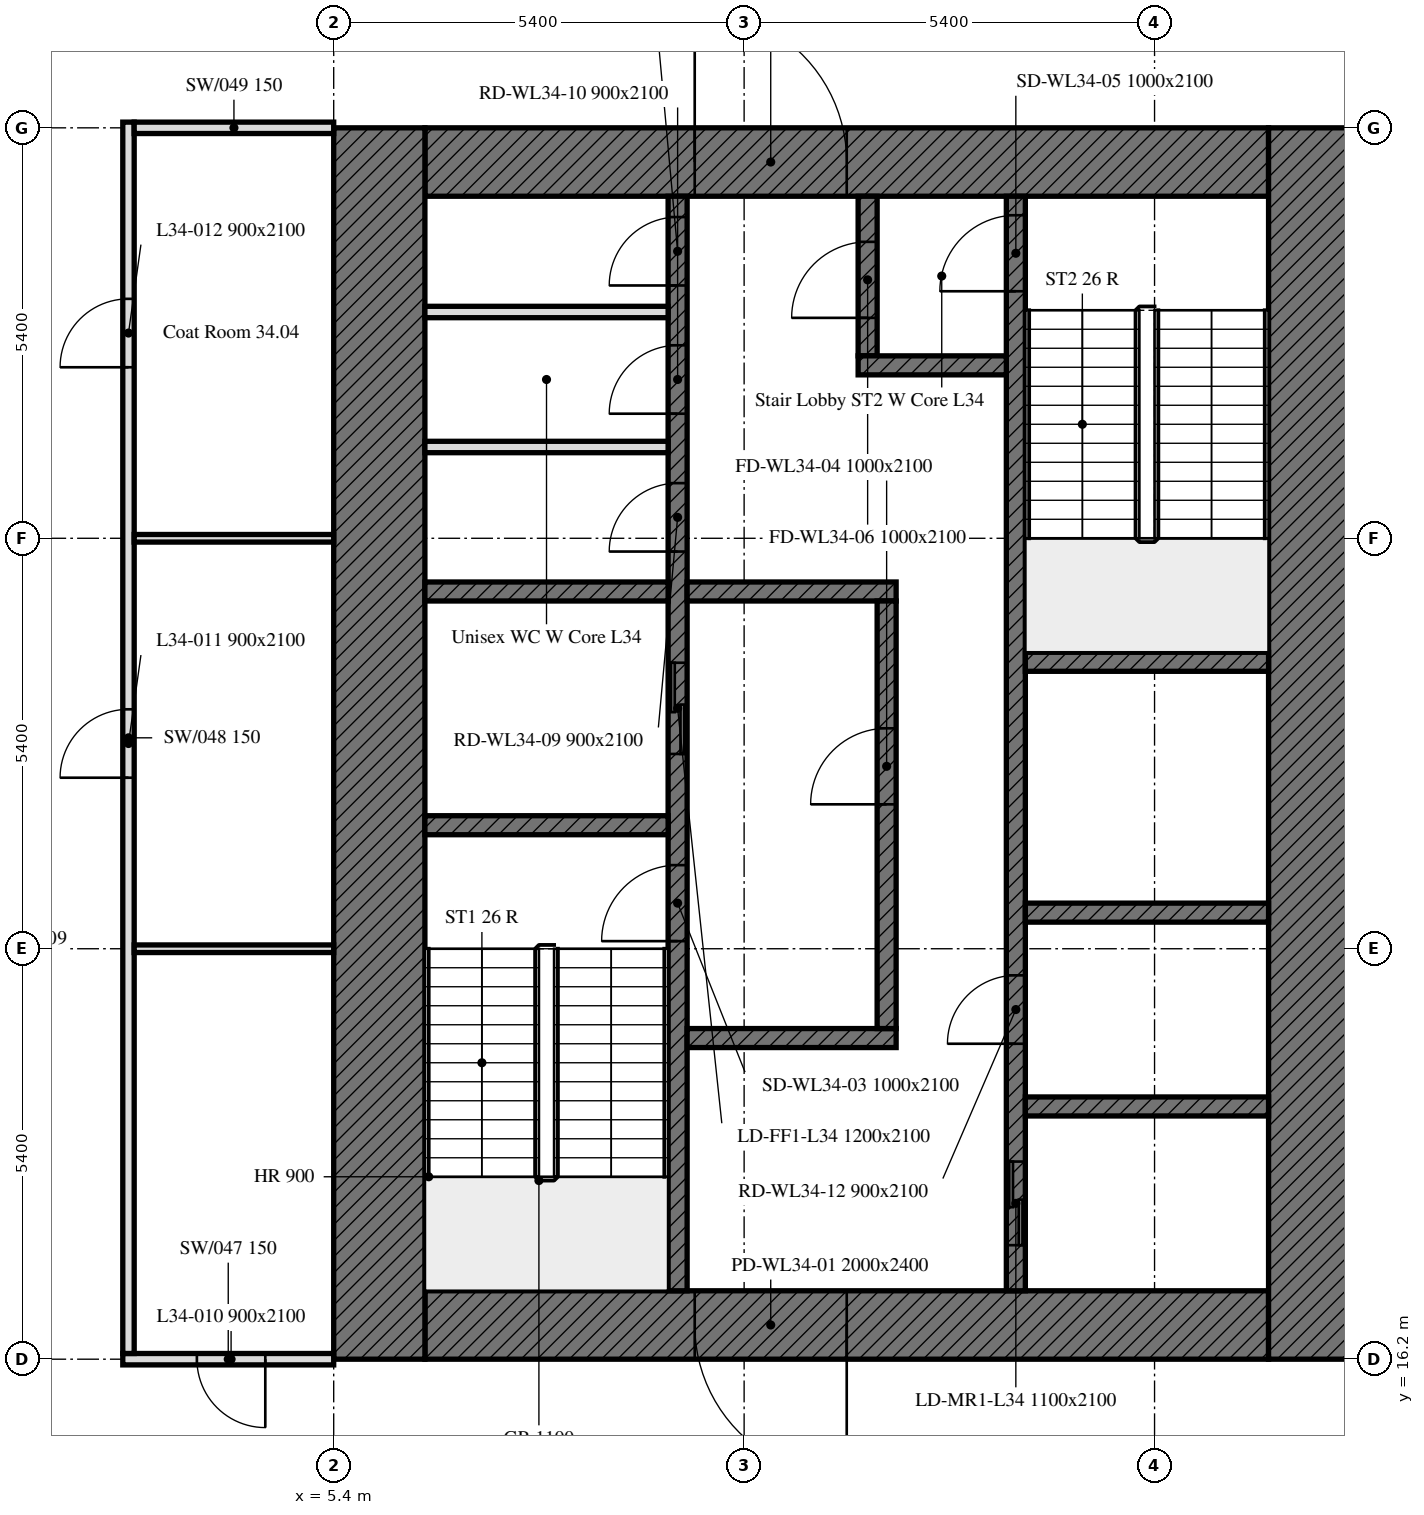
"""IFC4 building model, lengths in metres.
Left out: names, types, materials, properties, quantities, classifications, styles, units other than length and angle.
Written with IfcOpenShell. Run it as: python <this file> out.ifc"""

import sys

from ifc_helpers import new_model, si_unit, direction, frame, frame_2d, origin, place, context, subcontext, project, spatial, rectangle, extrude, element, fill, save


model = new_model("IFC4")
c1 = context("Model", 3, precision=1e-05, world=origin(), true_north=direction((0.0, 1.0)))
c2 = subcontext(c1, "Body", "Model", "MODEL_VIEW")
j1 = project(units=[si_unit("LENGTHUNIT", "METRE"), si_unit("PLANEANGLEUNIT", "RADIAN")], contexts=[c1])
p1 = place(None, origin())
s1 = spatial("IfcSite", under=j1, at=p1, CompositionType="ELEMENT")
p2 = place(p1, origin())
s2 = spatial("IfcBuilding", under=s1, at=p2, CompositionType="ELEMENT")
p3 = place(p2, frame((0.0, 0.0, 148.0)))
s3 = spatial("IfcBuildingStorey", under=s2, at=p3, CompositionType="ELEMENT", Elevation=148.0)
p4 = place(p3, frame((17.7, 16.65, 0.0), z_axis=(0.0, 0.0, 1.0), x_axis=(-1.0, 0.0, 0.0)))
e1 = element("IfcWall", 1, at=p4, inside=s3, PredefinedType="SOLIDWALL", context=c2, shape_type="SweptSolid", body=[
    extrude(rectangle(XDim=11.1, YDim=0.9, at=frame_2d((5.55, 0.0))), origin(), (0.0, 0.0, 1.0), 4.5),
])
p5 = place(p4, frame((5.55, 0.0, 0.0)))
e2 = element("IfcOpeningElement", 2, at=p5, cuts=e1, PredefinedType="OPENING", context=c2, shape_type="SweptSolid", body=[
    extrude(rectangle(XDim=2.0, YDim=2.4, at=frame_2d((1.0, 1.2))), frame((0.0, 0.45, 0.0), z_axis=(0.0, -1.0, 0.0), x_axis=(1.0, 0.0, 0.0)), (0.0, 0.0, 1.0), 0.9),
])
p6 = place(p3, frame((6.6, 31.95, 0.0), z_axis=(0.0, 0.0, 1.0), x_axis=(1.0, 0.0, 0.0)))
e3 = element("IfcWall", 3, at=p6, inside=s3, PredefinedType="SOLIDWALL", context=c2, shape_type="SweptSolid", body=[
    extrude(rectangle(XDim=11.1, YDim=0.9, at=frame_2d((5.55, 0.0))), origin(), (0.0, 0.0, 1.0), 4.5),
])
p7 = place(p6, frame((3.55, 0.0, 0.0)))
e4 = element("IfcOpeningElement", 4, at=p7, cuts=e3, PredefinedType="OPENING", context=c2, shape_type="SweptSolid", body=[
    extrude(rectangle(XDim=2.0, YDim=2.4, at=frame_2d((1.0, 1.2))), frame((0.0, 0.45, 0.0), z_axis=(0.0, -1.0, 0.0), x_axis=(1.0, 0.0, 0.0)), (0.0, 0.0, 1.0), 0.9),
])
for number, where, z_axis, x_axis in (
    (5, (6.0, 16.2, 0.0), (0.0, 0.0, 1.0), (0.0, 1.0, 0.0)),
    (6, (18.3, 32.4, 0.0), (0.0, 0.0, 1.0), (0.0, -1.0, 0.0)),
):
    element("IfcWall", number, at=place(p3, frame(where, z_axis=z_axis, x_axis=x_axis)), inside=s3, PredefinedType="SOLIDWALL", context=c2, shape_type="SweptSolid", body=[
        extrude(rectangle(XDim=16.2, YDim=1.2, at=frame_2d((8.1, 0.0))), origin(), (0.0, 0.0, 1.0), 4.5),
    ])
p8 = place(p3, frame((9.925, 17.1, 0.0), z_axis=(0.0, 0.0, 1.0), x_axis=(0.0, 1.0, 0.0)))
e7 = element("IfcWall", 7, at=p8, inside=s3, PredefinedType="SOLIDWALL", context=c2, shape_type="SweptSolid", body=[
    extrude(rectangle(XDim=14.4, YDim=0.25, at=frame_2d((7.2, 0.0))), origin(), (0.0, 0.0, 1.0), 4.5),
])
p9 = place(p8, frame((4.6, 0.0, 0.0)))
e8 = element("IfcOpeningElement", 8, at=p9, cuts=e7, PredefinedType="OPENING", context=c2, shape_type="SweptSolid", body=[
    extrude(rectangle(XDim=1.0, YDim=2.1, at=frame_2d((0.5, 1.05))), frame((0.0, 0.125, 0.0), z_axis=(0.0, -1.0, 0.0), x_axis=(1.0, 0.0, 0.0)), (0.0, 0.0, 1.0), 0.25),
])
p10 = place(p8, frame((7.062, 0.0, 0.0)))
e9 = element("IfcOpeningElement", 9, at=p10, cuts=e7, PredefinedType="OPENING", context=c2, shape_type="SweptSolid", body=[
    extrude(rectangle(XDim=1.2, YDim=2.1, at=frame_2d((0.6, 1.05))), frame((0.0, 0.125, 0.0), z_axis=(0.0, -1.0, 0.0), x_axis=(1.0, 0.0, 0.0)), (0.0, 0.0, 1.0), 0.25),
])
p11 = place(p8, frame((9.726, 0.0, 0.0)))
e10 = element("IfcOpeningElement", 10, at=p11, cuts=e7, PredefinedType="OPENING", context=c2, shape_type="SweptSolid", body=[
    extrude(rectangle(XDim=0.9, YDim=2.1, at=frame_2d((0.45, 1.05))), frame((0.0, 0.125, 0.0), z_axis=(0.0, -1.0, 0.0), x_axis=(1.0, 0.0, 0.0)), (0.0, 0.0, 1.0), 0.25),
])
p12 = place(p8, frame((11.539, 0.0, 0.0)))
e11 = element("IfcOpeningElement", 11, at=p12, cuts=e7, PredefinedType="OPENING", context=c2, shape_type="SweptSolid", body=[
    extrude(rectangle(XDim=0.9, YDim=2.1, at=frame_2d((0.45, 1.05))), frame((0.0, 0.125, 0.0), z_axis=(0.0, -1.0, 0.0), x_axis=(1.0, 0.0, 0.0)), (0.0, 0.0, 1.0), 0.25),
])
p13 = place(p8, frame((13.226, 0.0, 0.0)))
e12 = element("IfcOpeningElement", 12, at=p13, cuts=e7, PredefinedType="OPENING", context=c2, shape_type="SweptSolid", body=[
    extrude(rectangle(XDim=0.9, YDim=2.1, at=frame_2d((0.45, 1.05))), frame((0.0, 0.125, 0.0), z_axis=(0.0, -1.0, 0.0), x_axis=(1.0, 0.0, 0.0)), (0.0, 0.0, 1.0), 0.25),
])
p14 = place(p3, frame((14.375, 17.1, 0.0), z_axis=(0.0, 0.0, 1.0), x_axis=(0.0, 1.0, 0.0)))
e13 = element("IfcWall", 13, at=p14, inside=s3, PredefinedType="SOLIDWALL", context=c2, shape_type="SweptSolid", body=[
    extrude(rectangle(XDim=14.4, YDim=0.25, at=frame_2d((7.2, 0.0))), origin(), (0.0, 0.0, 1.0), 4.5),
])
p15 = place(p14, frame((13.15, 0.0, 0.0)))
e14 = element("IfcOpeningElement", 14, at=p15, cuts=e13, PredefinedType="OPENING", context=c2, shape_type="SweptSolid", body=[
    extrude(rectangle(XDim=1.0, YDim=2.1, at=frame_2d((0.5, 1.05))), frame((0.0, 0.125, 0.0), z_axis=(0.0, -1.0, 0.0), x_axis=(1.0, 0.0, 0.0)), (0.0, 0.0, 1.0), 0.25),
])
p16 = place(p14, frame((0.6, 0.0, 0.0)))
e15 = element("IfcOpeningElement", 15, at=p16, cuts=e13, PredefinedType="OPENING", context=c2, shape_type="SweptSolid", body=[
    extrude(rectangle(XDim=1.1, YDim=2.1, at=frame_2d((0.55, 1.05))), frame((0.0, 0.125, 0.0), z_axis=(0.0, -1.0, 0.0), x_axis=(1.0, 0.0, 0.0)), (0.0, 0.0, 1.0), 0.25),
])
p17 = place(p14, frame((3.25, 0.0, 0.0)))
e16 = element("IfcOpeningElement", 16, at=p17, cuts=e13, PredefinedType="OPENING", context=c2, shape_type="SweptSolid", body=[
    extrude(rectangle(XDim=0.9, YDim=2.1, at=frame_2d((0.45, 1.05))), frame((0.0, 0.125, 0.0), z_axis=(0.0, -1.0, 0.0), x_axis=(1.0, 0.0, 0.0)), (0.0, 0.0, 1.0), 0.25),
])
for number, where, z_axis, x_axis in (
    (17, (6.6, 23.225, 0.0), (0.0, 0.0, 1.0), (1.0, 0.0, 0.0)),
    (18, (14.5, 25.375, 0.0), (0.0, 0.0, 1.0), (1.0, 0.0, 0.0)),
    (19, (14.5, 22.075, 0.0), (0.0, 0.0, 1.0), (1.0, 0.0, 0.0)),
    (20, (6.6, 26.3, 0.0), (0.0, 0.0, 1.0), (1.0, 0.0, 0.0)),
):
    element("IfcWall", number, at=place(p3, frame(where, z_axis=z_axis, x_axis=x_axis)), inside=s3, PredefinedType="SOLIDWALL", context=c2, shape_type="SweptSolid", body=[
        extrude(rectangle(XDim=3.2, YDim=0.25, at=frame_2d((1.6, 0.0))), origin(), (0.0, 0.0, 1.0), 4.5),
    ])
for number, where, z_axis, x_axis in (
    (21, (10.05, 26.3, 0.0), (0.0, 0.0, 1.0), (1.0, 0.0, 0.0)),
    (22, (10.05, 20.425, 0.0), (0.0, 0.0, 1.0), (1.0, 0.0, 0.0)),
):
    element("IfcWall", number, at=place(p3, frame(where, z_axis=z_axis, x_axis=x_axis)), inside=s3, PredefinedType="SOLIDWALL", context=c2, shape_type="SweptSolid", body=[
        extrude(rectangle(XDim=2.75, YDim=0.25, at=frame_2d((1.375, 0.0))), origin(), (0.0, 0.0, 1.0), 4.5),
    ])
p18 = place(p3, frame((12.425, 29.4, 0.0), z_axis=(0.0, 0.0, 1.0), x_axis=(0.0, 1.0, 0.0)))
e23 = element("IfcWall", 23, at=p18, inside=s3, PredefinedType="SOLIDWALL", context=c2, shape_type="SweptSolid", body=[
    extrude(rectangle(XDim=2.1, YDim=0.25, at=frame_2d((1.05, 0.0))), origin(), (0.0, 0.0, 1.0), 4.5),
])
p19 = place(p18, frame((0.5, 0.0, 0.0)))
e24 = element("IfcOpeningElement", 24, at=p19, cuts=e23, PredefinedType="OPENING", context=c2, shape_type="SweptSolid", body=[
    extrude(rectangle(XDim=1.0, YDim=2.1, at=frame_2d((0.5, 1.05))), frame((0.0, 0.125, 0.0), z_axis=(0.0, -1.0, 0.0), x_axis=(1.0, 0.0, 0.0)), (0.0, 0.0, 1.0), 0.25),
])
p20 = place(p3, frame((12.3, 29.275, 0.0), z_axis=(0.0, 0.0, 1.0), x_axis=(1.0, 0.0, 0.0)))
e25 = element("IfcWall", 25, at=p20, inside=s3, PredefinedType="SOLIDWALL", context=c2, shape_type="SweptSolid", body=[
    extrude(rectangle(XDim=1.95, YDim=0.25, at=frame_2d((0.975, 0.0))), origin(), (0.0, 0.0, 1.0), 4.5),
])
p21 = place(p3, frame((12.675, 20.55, 0.0), z_axis=(0.0, 0.0, 1.0), x_axis=(0.0, 1.0, 0.0)))
e26 = element("IfcWall", 26, at=p21, inside=s3, PredefinedType="SOLIDWALL", context=c2, shape_type="SweptSolid", body=[
    extrude(rectangle(XDim=5.625, YDim=0.25, at=frame_2d((2.812, 0.0))), origin(), (0.0, 0.0, 1.0), 4.5),
])
p22 = place(p21, frame((2.95, 0.0, 0.0)))
e27 = element("IfcOpeningElement", 27, at=p22, cuts=e26, PredefinedType="OPENING", context=c2, shape_type="SweptSolid", body=[
    extrude(rectangle(XDim=1.0, YDim=2.1, at=frame_2d((0.5, 1.05))), frame((0.0, 0.125, 0.0), z_axis=(0.0, -1.0, 0.0), x_axis=(1.0, 0.0, 0.0)), (0.0, 0.0, 1.0), 0.25),
])
p23 = place(p3, frame((14.5, 19.525, 0.0), z_axis=(0.0, 0.0, 1.0), x_axis=(1.0, 0.0, 0.0)))
e28 = element("IfcWall", 28, at=p23, inside=s3, PredefinedType="SOLIDWALL", context=c2, shape_type="SweptSolid", body=[
    extrude(rectangle(XDim=3.2, YDim=0.25, at=frame_2d((1.6, 0.0))), origin(), (0.0, 0.0, 1.0), 4.5),
])
for number, where, z_axis, x_axis in (
    (29, (6.6, 28.201, 0.0), (0.0, 0.0, 1.0), (1.0, 0.0, 0.0)),
    (30, (6.6, 29.977, 0.0), (0.0, 0.0, 1.0), (1.0, 0.0, 0.0)),
):
    element("IfcWall", number, at=place(p3, frame(where, z_axis=z_axis, x_axis=x_axis)), inside=s3, PredefinedType="PARTITIONING", context=c2, shape_type="SweptSolid", body=[
        extrude(rectangle(XDim=3.2, YDim=0.15, at=frame_2d((1.6, 0.0))), origin(), (0.0, 0.0, 1.0), 4.5),
    ])
p24 = place(p3, frame((5.4, 16.2, 0.0), z_axis=(0.0, 0.0, 1.0), x_axis=(-1.0, 0.0, 0.0)))
e31 = element("IfcWall", 31, at=p24, inside=s3, PredefinedType="PARTITIONING", context=c2, shape_type="SweptSolid", body=[
    extrude(rectangle(XDim=2.775, YDim=0.15, at=frame_2d((1.387, 0.0))), origin(), (0.0, 0.0, 1.0), 3.75),
])
p25 = place(p24, frame((0.9, 0.0, 0.0)))
e32 = element("IfcOpeningElement", 32, at=p25, cuts=e31, PredefinedType="OPENING", context=c2, shape_type="SweptSolid", body=[
    extrude(rectangle(XDim=0.9, YDim=2.1, at=frame_2d((0.45, 1.05))), frame((0.0, 0.075, 0.0), z_axis=(0.0, -1.0, 0.0), x_axis=(1.0, 0.0, 0.0)), (0.0, 0.0, 1.0), 0.15),
])
p26 = place(p3, frame((2.7, 16.275, 0.0), z_axis=(0.0, 0.0, 1.0), x_axis=(0.0, 1.0, 0.0)))
e33 = element("IfcWall", 33, at=p26, inside=s3, PredefinedType="PARTITIONING", context=c2, shape_type="SweptSolid", body=[
    extrude(rectangle(XDim=16.2, YDim=0.15, at=frame_2d((8.1, 0.0))), origin(), (0.0, 0.0, 1.0), 3.75),
])
p27 = place(p26, frame((7.575, 0.0, 0.0)))
e34 = element("IfcOpeningElement", 34, at=p27, cuts=e33, PredefinedType="OPENING", context=c2, shape_type="SweptSolid", body=[
    extrude(rectangle(XDim=0.9, YDim=2.1, at=frame_2d((0.45, 1.05))), frame((0.0, 0.075, 0.0), z_axis=(0.0, -1.0, 0.0), x_axis=(1.0, 0.0, 0.0)), (0.0, 0.0, 1.0), 0.15),
])
p28 = place(p26, frame((12.975, 0.0, 0.0)))
e35 = element("IfcOpeningElement", 35, at=p28, cuts=e33, PredefinedType="OPENING", context=c2, shape_type="SweptSolid", body=[
    extrude(rectangle(XDim=0.9, YDim=2.1, at=frame_2d((0.45, 1.05))), frame((0.0, 0.075, 0.0), z_axis=(0.0, -1.0, 0.0), x_axis=(1.0, 0.0, 0.0)), (0.0, 0.0, 1.0), 0.15),
])
p29 = place(p3, frame((2.775, 32.4, 0.0), z_axis=(0.0, 0.0, 1.0), x_axis=(1.0, 0.0, 0.0)))
e36 = element("IfcWall", 36, at=p29, inside=s3, PredefinedType="PARTITIONING", context=c2, shape_type="SweptSolid", body=[
    extrude(rectangle(XDim=2.625, YDim=0.15, at=frame_2d((1.312, 0.0))), origin(), (0.0, 0.0, 1.0), 3.75),
])
for number, where, z_axis, x_axis in (
    (37, (5.4, 21.6, 0.0), (0.0, 0.0, 1.0), (-1.0, 0.0, 0.0)),
    (38, (5.4, 27.0, 0.0), (0.0, 0.0, 1.0), (-1.0, 0.0, 0.0)),
):
    element("IfcWall", number, at=place(p3, frame(where, z_axis=z_axis, x_axis=x_axis)), inside=s3, PredefinedType="PARTITIONING", context=c2, shape_type="SweptSolid", body=[
        extrude(rectangle(XDim=2.625, YDim=0.1, at=frame_2d((1.312, 0.0))), origin(), (0.0, 0.0, 1.0), 3.75),
    ])
p30 = place(p5, origin())
e39 = element("IfcDoor", 39, at=p30, inside=s3, OperationType="DOUBLE_DOOR_SINGLE_SWING", PredefinedType="DOOR", context=c2, shape_type="SweptSolid", body=[
    extrude(rectangle(XDim=2.0, YDim=2.4, at=frame_2d((1.0, 1.2))), frame((0.0, 0.025, 0.0), z_axis=(0.0, -1.0, 0.0), x_axis=(1.0, 0.0, 0.0)), (0.0, 0.0, 1.0), 0.05),
])
fill(e2, e39)
p31 = place(p7, origin())
e40 = element("IfcDoor", 40, at=p31, inside=s3, OperationType="DOUBLE_DOOR_SINGLE_SWING", PredefinedType="DOOR", context=c2, shape_type="SweptSolid", body=[
    extrude(rectangle(XDim=2.0, YDim=2.4, at=frame_2d((1.0, 1.2))), frame((0.0, 0.025, 0.0), z_axis=(0.0, -1.0, 0.0), x_axis=(1.0, 0.0, 0.0)), (0.0, 0.0, 1.0), 0.05),
])
fill(e4, e40)
p32 = place(p9, origin())
e41 = element("IfcDoor", 41, at=p32, inside=s3, OperationType="SINGLE_SWING_LEFT", PredefinedType="DOOR", context=c2, shape_type="SweptSolid", body=[
    extrude(rectangle(XDim=1.0, YDim=2.1, at=frame_2d((0.5, 1.05))), frame((0.0, 0.025, 0.0), z_axis=(0.0, -1.0, 0.0), x_axis=(1.0, 0.0, 0.0)), (0.0, 0.0, 1.0), 0.05),
])
fill(e8, e41)
p33 = place(p22, origin())
e42 = element("IfcDoor", 42, at=p33, inside=s3, OperationType="SINGLE_SWING_LEFT", PredefinedType="DOOR", context=c2, shape_type="SweptSolid", body=[
    extrude(rectangle(XDim=1.0, YDim=2.1, at=frame_2d((0.5, 1.05))), frame((0.0, 0.025, 0.0), z_axis=(0.0, -1.0, 0.0), x_axis=(1.0, 0.0, 0.0)), (0.0, 0.0, 1.0), 0.05),
])
fill(e27, e42)
p34 = place(p15, origin())
e43 = element("IfcDoor", 43, at=p34, inside=s3, OperationType="SINGLE_SWING_LEFT", PredefinedType="DOOR", context=c2, shape_type="SweptSolid", body=[
    extrude(rectangle(XDim=1.0, YDim=2.1, at=frame_2d((0.5, 1.05))), frame((0.0, 0.025, 0.0), z_axis=(0.0, -1.0, 0.0), x_axis=(1.0, 0.0, 0.0)), (0.0, 0.0, 1.0), 0.05),
])
fill(e14, e43)
p35 = place(p19, origin())
e44 = element("IfcDoor", 44, at=p35, inside=s3, OperationType="SINGLE_SWING_LEFT", PredefinedType="DOOR", context=c2, shape_type="SweptSolid", body=[
    extrude(rectangle(XDim=1.0, YDim=2.1, at=frame_2d((0.5, 1.05))), frame((0.0, 0.025, 0.0), z_axis=(0.0, -1.0, 0.0), x_axis=(1.0, 0.0, 0.0)), (0.0, 0.0, 1.0), 0.05),
])
fill(e24, e44)
p36 = place(p10, origin())
e45 = element("IfcDoor", 45, at=p36, inside=s3, OperationType="DOUBLE_DOOR_SLIDING", PredefinedType="DOOR", context=c2, shape_type="SweptSolid", body=[
    extrude(rectangle(XDim=1.2, YDim=2.1, at=frame_2d((0.6, 1.05))), frame((0.0, 0.025, 0.0), z_axis=(0.0, -1.0, 0.0), x_axis=(1.0, 0.0, 0.0)), (0.0, 0.0, 1.0), 0.05),
])
fill(e9, e45)
p37 = place(p16, origin())
e46 = element("IfcDoor", 46, at=p37, inside=s3, OperationType="DOUBLE_DOOR_SLIDING", PredefinedType="DOOR", context=c2, shape_type="SweptSolid", body=[
    extrude(rectangle(XDim=1.1, YDim=2.1, at=frame_2d((0.55, 1.05))), frame((0.0, 0.025, 0.0), z_axis=(0.0, -1.0, 0.0), x_axis=(1.0, 0.0, 0.0)), (0.0, 0.0, 1.0), 0.05),
])
fill(e15, e46)
p38 = place(p11, origin())
e47 = element("IfcDoor", 47, at=p38, inside=s3, OperationType="SINGLE_SWING_LEFT", PredefinedType="DOOR", context=c2, shape_type="SweptSolid", body=[
    extrude(rectangle(XDim=0.9, YDim=2.1, at=frame_2d((0.45, 1.05))), frame((0.0, 0.025, 0.0), z_axis=(0.0, -1.0, 0.0), x_axis=(1.0, 0.0, 0.0)), (0.0, 0.0, 1.0), 0.05),
])
fill(e10, e47)
p39 = place(p12, origin())
e48 = element("IfcDoor", 48, at=p39, inside=s3, OperationType="SINGLE_SWING_LEFT", PredefinedType="DOOR", context=c2, shape_type="SweptSolid", body=[
    extrude(rectangle(XDim=0.9, YDim=2.1, at=frame_2d((0.45, 1.05))), frame((0.0, 0.025, 0.0), z_axis=(0.0, -1.0, 0.0), x_axis=(1.0, 0.0, 0.0)), (0.0, 0.0, 1.0), 0.05),
])
fill(e11, e48)
p40 = place(p13, origin())
e49 = element("IfcDoor", 49, at=p40, inside=s3, OperationType="SINGLE_SWING_LEFT", PredefinedType="DOOR", context=c2, shape_type="SweptSolid", body=[
    extrude(rectangle(XDim=0.9, YDim=2.1, at=frame_2d((0.45, 1.05))), frame((0.0, 0.025, 0.0), z_axis=(0.0, -1.0, 0.0), x_axis=(1.0, 0.0, 0.0)), (0.0, 0.0, 1.0), 0.05),
])
fill(e12, e49)
p41 = place(p17, origin())
e50 = element("IfcDoor", 50, at=p41, inside=s3, OperationType="SINGLE_SWING_LEFT", PredefinedType="DOOR", context=c2, shape_type="SweptSolid", body=[
    extrude(rectangle(XDim=0.9, YDim=2.1, at=frame_2d((0.45, 1.05))), frame((0.0, 0.025, 0.0), z_axis=(0.0, -1.0, 0.0), x_axis=(1.0, 0.0, 0.0)), (0.0, 0.0, 1.0), 0.05),
])
fill(e16, e50)
p42 = place(p25, origin())
e51 = element("IfcDoor", 51, at=p42, inside=s3, OperationType="SINGLE_SWING_RIGHT", PredefinedType="DOOR", context=c2, shape_type="SweptSolid", body=[
    extrude(rectangle(XDim=0.9, YDim=2.1, at=frame_2d((0.45, 1.05))), frame((0.0, 0.025, 0.0), z_axis=(0.0, -1.0, 0.0), x_axis=(1.0, 0.0, 0.0)), (0.0, 0.0, 1.0), 0.05),
])
fill(e32, e51)
p43 = place(p27, origin())
e52 = element("IfcDoor", 52, at=p43, inside=s3, OperationType="SINGLE_SWING_RIGHT", PredefinedType="DOOR", context=c2, shape_type="SweptSolid", body=[
    extrude(rectangle(XDim=0.9, YDim=2.1, at=frame_2d((0.45, 1.05))), frame((0.0, 0.025, 0.0), z_axis=(0.0, -1.0, 0.0), x_axis=(1.0, 0.0, 0.0)), (0.0, 0.0, 1.0), 0.05),
])
fill(e34, e52)
p44 = place(p28, origin())
e53 = element("IfcDoor", 53, at=p44, inside=s3, OperationType="SINGLE_SWING_RIGHT", PredefinedType="DOOR", context=c2, shape_type="SweptSolid", body=[
    extrude(rectangle(XDim=0.9, YDim=2.1, at=frame_2d((0.45, 1.05))), frame((0.0, 0.025, 0.0), z_axis=(0.0, -1.0, 0.0), x_axis=(1.0, 0.0, 0.0)), (0.0, 0.0, 1.0), 0.05),
])
fill(e35, e53)
save(model, sys.argv[1])
